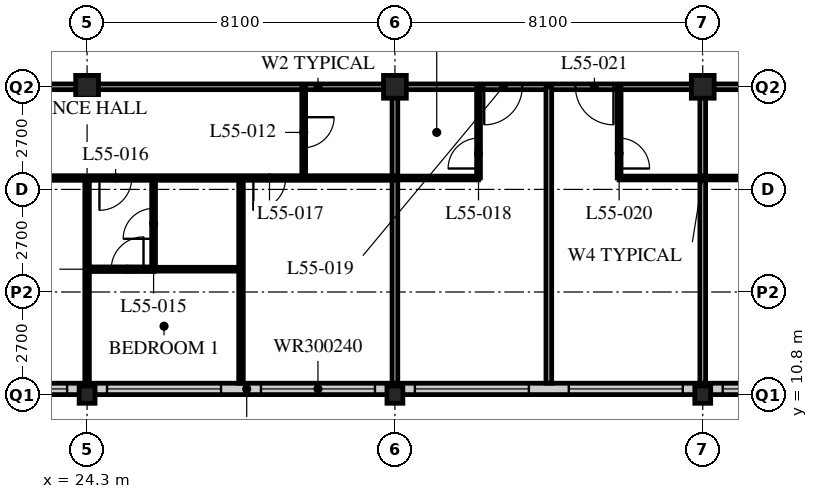
"""IFC4 building model, lengths in metres.
Left out: names, types, materials, properties, quantities, classifications, styles, units other than length and angle.
Written with IfcOpenShell. Run it as: python <this file> out.ifc"""

import sys

from ifc_helpers import new_model, si_unit, direction, frame, frame_2d, origin, origin_2d, place, context, subcontext, project, spatial, rectangle, hollow_rectangle, i_section, extrude, element, fill, save


model = new_model("IFC4")
c1 = context("Model", 3, precision=1e-05, world=origin(), true_north=direction((0.0, 1.0)))
c2 = subcontext(c1, "Body", "Model", "MODEL_VIEW")
j1 = project(units=[si_unit("LENGTHUNIT", "METRE"), si_unit("PLANEANGLEUNIT", "RADIAN")], contexts=[c1])
p1 = place(None, origin())
s1 = spatial("IfcSite", under=j1, at=p1, CompositionType="ELEMENT")
p2 = place(p1, origin())
s2 = spatial("IfcBuilding", under=s1, at=p2, CompositionType="ELEMENT")
p3 = place(p2, frame((0.0, 0.0, 213.6)))
s3 = spatial("IfcBuildingStorey", under=s2, at=p3, CompositionType="ELEMENT", Elevation=213.6)
p4 = place(p3, frame((24.3, 10.8, 0.0), z_axis=(0.0, 0.0, 1.0), x_axis=(1.0, 0.0, 0.0)))
e1 = element("IfcColumn", 1, at=p4, inside=s3, PredefinedType="COLUMN", context=c2, shape_type="SweptSolid", body=[
    extrude(i_section(OverallWidth=0.418, OverallDepth=0.456, WebThickness=0.042, FlangeThickness=0.067, FilletRadius=0.015, at=origin_2d()), origin(), (0.0, 0.0, 1.0), 3.6),
])
p5 = place(p3, frame((24.3, 18.9, 0.0), z_axis=(0.0, 0.0, 1.0), x_axis=(1.0, 0.0, 0.0)))
e2 = element("IfcColumn", 2, at=p5, inside=s3, PredefinedType="COLUMN", context=c2, shape_type="SweptSolid", body=[
    extrude(hollow_rectangle(XDim=0.6, YDim=0.6, WallThickness=0.05, at=origin_2d()), origin(), (0.0, 0.0, 1.0), 3.6),
])
p6 = place(p3, frame((32.4, 10.8, 0.0), z_axis=(0.0, 0.0, 1.0), x_axis=(1.0, 0.0, 0.0)))
e3 = element("IfcColumn", 3, at=p6, inside=s3, PredefinedType="COLUMN", context=c2, shape_type="SweptSolid", body=[
    extrude(i_section(OverallWidth=0.418, OverallDepth=0.456, WebThickness=0.042, FlangeThickness=0.067, FilletRadius=0.015, at=origin_2d()), origin(), (0.0, 0.0, 1.0), 3.6),
])
p7 = place(p3, frame((32.4, 18.9, 0.0), z_axis=(0.0, 0.0, 1.0), x_axis=(1.0, 0.0, 0.0)))
e4 = element("IfcColumn", 4, at=p7, inside=s3, PredefinedType="COLUMN", context=c2, shape_type="SweptSolid", body=[
    extrude(hollow_rectangle(XDim=0.6, YDim=0.6, WallThickness=0.05, at=origin_2d()), origin(), (0.0, 0.0, 1.0), 3.6),
])
p8 = place(p3, frame((40.5, 10.8, 0.0), z_axis=(0.0, 0.0, 1.0), x_axis=(1.0, 0.0, 0.0)))
e5 = element("IfcColumn", 5, at=p8, inside=s3, PredefinedType="COLUMN", context=c2, shape_type="SweptSolid", body=[
    extrude(i_section(OverallWidth=0.418, OverallDepth=0.456, WebThickness=0.042, FlangeThickness=0.067, FilletRadius=0.015, at=origin_2d()), origin(), (0.0, 0.0, 1.0), 3.6),
])
p9 = place(p3, frame((40.5, 18.9, 0.0), z_axis=(0.0, 0.0, 1.0), x_axis=(1.0, 0.0, 0.0)))
e6 = element("IfcColumn", 6, at=p9, inside=s3, PredefinedType="COLUMN", context=c2, shape_type="SweptSolid", body=[
    extrude(hollow_rectangle(XDim=0.6, YDim=0.6, WallThickness=0.05, at=origin_2d()), origin(), (0.0, 0.0, 1.0), 3.6),
])
p10 = place(p3, frame((8.4, 10.95, 0.0), z_axis=(0.0, 0.0, 1.0), x_axis=(1.0, 0.0, 0.0)))
e7 = element("IfcWall", 7, at=p10, inside=s3, PredefinedType="SOLIDWALL", context=c2, shape_type="SweptSolid", body=[
    extrude(rectangle(XDim=40.2, YDim=0.3, at=frame_2d((20.1, 0.0))), origin(), (0.0, 0.0, 1.0), 3.39),
])
p11 = place(p10, frame((0.225, 0.0, 0.6)))
e8 = element("IfcOpeningElement", 8, at=p11, cuts=e7, PredefinedType="OPENING", context=c2, shape_type="SweptSolid", body=[
    extrude(rectangle(XDim=3.0, YDim=2.4, at=frame_2d((1.5, 1.2))), frame((0.0, 0.16, 0.0), z_axis=(0.0, -1.0, 0.0), x_axis=(1.0, 0.0, 0.0)), (0.0, 0.0, 1.0), 0.32),
])
p12 = place(p10, frame((4.275, 0.0, 0.6)))
e9 = element("IfcOpeningElement", 9, at=p12, cuts=e7, PredefinedType="OPENING", context=c2, shape_type="SweptSolid", body=[
    extrude(rectangle(XDim=3.0, YDim=2.4, at=frame_2d((1.5, 1.2))), frame((0.0, 0.16, 0.0), z_axis=(0.0, -1.0, 0.0), x_axis=(1.0, 0.0, 0.0)), (0.0, 0.0, 1.0), 0.32),
])
p13 = place(p10, frame((8.325, 0.0, 0.6)))
e10 = element("IfcOpeningElement", 10, at=p13, cuts=e7, PredefinedType="OPENING", context=c2, shape_type="SweptSolid", body=[
    extrude(rectangle(XDim=3.0, YDim=2.4, at=frame_2d((1.5, 1.2))), frame((0.0, 0.16, 0.0), z_axis=(0.0, -1.0, 0.0), x_axis=(1.0, 0.0, 0.0)), (0.0, 0.0, 1.0), 0.32),
])
p14 = place(p10, frame((12.375, 0.0, 0.6)))
e11 = element("IfcOpeningElement", 11, at=p14, cuts=e7, PredefinedType="OPENING", context=c2, shape_type="SweptSolid", body=[
    extrude(rectangle(XDim=3.0, YDim=2.4, at=frame_2d((1.5, 1.2))), frame((0.0, 0.16, 0.0), z_axis=(0.0, -1.0, 0.0), x_axis=(1.0, 0.0, 0.0)), (0.0, 0.0, 1.0), 0.32),
])
p15 = place(p10, frame((16.425, 0.0, 0.6)))
e12 = element("IfcOpeningElement", 12, at=p15, cuts=e7, PredefinedType="OPENING", context=c2, shape_type="SweptSolid", body=[
    extrude(rectangle(XDim=3.0, YDim=2.4, at=frame_2d((1.5, 1.2))), frame((0.0, 0.16, 0.0), z_axis=(0.0, -1.0, 0.0), x_axis=(1.0, 0.0, 0.0)), (0.0, 0.0, 1.0), 0.32),
])
p16 = place(p10, frame((20.475, 0.0, 0.6)))
e13 = element("IfcOpeningElement", 13, at=p16, cuts=e7, PredefinedType="OPENING", context=c2, shape_type="SweptSolid", body=[
    extrude(rectangle(XDim=3.0, YDim=2.4, at=frame_2d((1.5, 1.2))), frame((0.0, 0.16, 0.0), z_axis=(0.0, -1.0, 0.0), x_axis=(1.0, 0.0, 0.0)), (0.0, 0.0, 1.0), 0.32),
])
p17 = place(p10, frame((24.525, 0.0, 0.6)))
e14 = element("IfcOpeningElement", 14, at=p17, cuts=e7, PredefinedType="OPENING", context=c2, shape_type="SweptSolid", body=[
    extrude(rectangle(XDim=3.0, YDim=2.4, at=frame_2d((1.5, 1.2))), frame((0.0, 0.16, 0.0), z_axis=(0.0, -1.0, 0.0), x_axis=(1.0, 0.0, 0.0)), (0.0, 0.0, 1.0), 0.32),
])
p18 = place(p10, frame((28.575, 0.0, 0.6)))
e15 = element("IfcOpeningElement", 15, at=p18, cuts=e7, PredefinedType="OPENING", context=c2, shape_type="SweptSolid", body=[
    extrude(rectangle(XDim=3.0, YDim=2.4, at=frame_2d((1.5, 1.2))), frame((0.0, 0.16, 0.0), z_axis=(0.0, -1.0, 0.0), x_axis=(1.0, 0.0, 0.0)), (0.0, 0.0, 1.0), 0.32),
])
p19 = place(p10, frame((32.625, 0.0, 0.6)))
e16 = element("IfcOpeningElement", 16, at=p19, cuts=e7, PredefinedType="OPENING", context=c2, shape_type="SweptSolid", body=[
    extrude(rectangle(XDim=3.0, YDim=2.4, at=frame_2d((1.5, 1.2))), frame((0.0, 0.16, 0.0), z_axis=(0.0, -1.0, 0.0), x_axis=(1.0, 0.0, 0.0)), (0.0, 0.0, 1.0), 0.32),
])
p20 = place(p10, frame((36.675, 0.0, 0.6)))
e17 = element("IfcOpeningElement", 17, at=p20, cuts=e7, PredefinedType="OPENING", context=c2, shape_type="SweptSolid", body=[
    extrude(rectangle(XDim=3.0, YDim=2.4, at=frame_2d((1.5, 1.2))), frame((0.0, 0.16, 0.0), z_axis=(0.0, -1.0, 0.0), x_axis=(1.0, 0.0, 0.0)), (0.0, 0.0, 1.0), 0.32),
])
p21 = place(p3, frame((12.15, 18.9, 0.0), z_axis=(0.0, 0.0, 1.0), x_axis=(1.0, 0.0, 0.0)))
e18 = element("IfcWall", 18, at=p21, inside=s3, PredefinedType="PARTITIONING", context=c2, shape_type="SweptSolid", body=[
    extrude(rectangle(XDim=36.45, YDim=0.15, at=frame_2d((18.225, 0.0))), origin(), (0.0, 0.0, 1.0), 2.778),
])
p22 = place(p21, frame((4.95, 0.0, 0.0)))
e19 = element("IfcOpeningElement", 19, at=p22, cuts=e18, PredefinedType="OPENING", context=c2, shape_type="SweptSolid", body=[
    extrude(rectangle(XDim=1.0, YDim=2.1, at=frame_2d((0.5, 1.05))), frame((0.0, 0.085, 0.0), z_axis=(0.0, -1.0, 0.0), x_axis=(1.0, 0.0, 0.0)), (0.0, 0.0, 1.0), 0.17),
])
p23 = place(p21, frame((22.6, 0.0, 0.0)))
e20 = element("IfcOpeningElement", 20, at=p23, cuts=e18, PredefinedType="OPENING", context=c2, shape_type="SweptSolid", body=[
    extrude(rectangle(XDim=1.0, YDim=2.1, at=frame_2d((0.5, 1.05))), frame((0.0, 0.085, 0.0), z_axis=(0.0, -1.0, 0.0), x_axis=(1.0, 0.0, 0.0)), (0.0, 0.0, 1.0), 0.17),
])
p24 = place(p21, frame((25.0, 0.0, 0.0)))
e21 = element("IfcOpeningElement", 21, at=p24, cuts=e18, PredefinedType="OPENING", context=c2, shape_type="SweptSolid", body=[
    extrude(rectangle(XDim=1.0, YDim=2.1, at=frame_2d((0.5, 1.05))), frame((0.0, 0.085, 0.0), z_axis=(0.0, -1.0, 0.0), x_axis=(1.0, 0.0, 0.0)), (0.0, 0.0, 1.0), 0.17),
])
p25 = place(p21, frame((30.7, 0.0, 0.0)))
e22 = element("IfcOpeningElement", 22, at=p25, cuts=e18, PredefinedType="OPENING", context=c2, shape_type="SweptSolid", body=[
    extrude(rectangle(XDim=1.0, YDim=2.1, at=frame_2d((0.5, 1.05))), frame((0.0, 0.085, 0.0), z_axis=(0.0, -1.0, 0.0), x_axis=(1.0, 0.0, 0.0)), (0.0, 0.0, 1.0), 0.17),
])
p26 = place(p21, frame((1.525, 0.0, 0.0)))
e23 = element("IfcOpeningElement", 23, at=p26, cuts=e18, PredefinedType="OPENING", context=c2, shape_type="SweptSolid", body=[
    extrude(rectangle(XDim=1.0, YDim=2.1, at=frame_2d((0.5, 1.05))), frame((0.0, 0.085, 0.0), z_axis=(0.0, -1.0, 0.0), x_axis=(1.0, 0.0, 0.0)), (0.0, 0.0, 1.0), 0.17),
])
p27 = place(p21, frame((32.825, 0.0, 0.0)))
e24 = element("IfcOpeningElement", 24, at=p27, cuts=e18, PredefinedType="OPENING", context=c2, shape_type="SweptSolid", body=[
    extrude(rectangle(XDim=1.0, YDim=2.1, at=frame_2d((0.5, 1.05))), frame((0.0, 0.085, 0.0), z_axis=(0.0, -1.0, 0.0), x_axis=(1.0, 0.0, 0.0)), (0.0, 0.0, 1.0), 0.17),
])
p28 = place(p3, frame((30.0, 18.9, 0.0), z_axis=(0.0, 0.0, 1.0), x_axis=(0.0, -1.0, 0.0)))
e25 = element("IfcWall", 25, at=p28, inside=s3, PredefinedType="PARTITIONING", context=c2, shape_type="SweptSolid", body=[
    extrude(rectangle(XDim=2.4, YDim=0.1, at=frame_2d((1.2, 0.0))), origin(), (0.0, 0.0, 1.0), 3.39),
])
p29 = place(p28, frame((0.8, 0.0, 0.0)))
e26 = element("IfcOpeningElement", 26, at=p29, cuts=e25, PredefinedType="OPENING", context=c2, shape_type="SweptSolid", body=[
    extrude(rectangle(XDim=0.8, YDim=2.1, at=frame_2d((0.4, 1.05))), frame((0.0, 0.06, 0.0), z_axis=(0.0, -1.0, 0.0), x_axis=(1.0, 0.0, 0.0)), (0.0, 0.0, 1.0), 0.12),
])
p30 = place(p3, frame((26.05, 16.5, 0.0), z_axis=(0.0, 0.0, 1.0), x_axis=(0.0, -1.0, 0.0)))
e27 = element("IfcWall", 27, at=p30, inside=s3, PredefinedType="PARTITIONING", context=c2, shape_type="SweptSolid", body=[
    extrude(rectangle(XDim=2.4, YDim=0.1, at=frame_2d((1.2, 0.0))), origin(), (0.0, 0.0, 1.0), 3.39),
])
p31 = place(p30, frame((0.8, 0.0, 0.0)))
e28 = element("IfcOpeningElement", 28, at=p31, cuts=e27, PredefinedType="OPENING", context=c2, shape_type="SweptSolid", body=[
    extrude(rectangle(XDim=0.8, YDim=2.1, at=frame_2d((0.4, 1.05))), frame((0.0, 0.06, 0.0), z_axis=(0.0, -1.0, 0.0), x_axis=(1.0, 0.0, 0.0)), (0.0, 0.0, 1.0), 0.12),
])
p32 = place(p3, frame((26.05, 14.1, 0.0), z_axis=(0.0, 0.0, 1.0), x_axis=(1.0, 0.0, 0.0)))
e29 = element("IfcWall", 29, at=p32, inside=s3, PredefinedType="PARTITIONING", context=c2, shape_type="SweptSolid", body=[
    extrude(rectangle(XDim=2.3, YDim=0.1, at=frame_2d((1.15, 0.0))), origin(), (0.0, 0.0, 1.0), 3.39),
])
p33 = place(p3, frame((24.3, 16.5, 0.0), z_axis=(0.0, 0.0, 1.0), x_axis=(0.0, -1.0, 0.0)))
e30 = element("IfcWall", 30, at=p33, inside=s3, PredefinedType="PARTITIONING", context=c2, shape_type="SweptSolid", body=[
    extrude(rectangle(XDim=5.4, YDim=0.12, at=frame_2d((2.7, 0.0))), origin(), (0.0, 0.0, 1.0), 2.778),
])
p34 = place(p3, frame((28.35, 16.5, 0.0), z_axis=(0.0, 0.0, 1.0), x_axis=(0.0, -1.0, 0.0)))
e31 = element("IfcWall", 31, at=p34, inside=s3, PredefinedType="PARTITIONING", context=c2, shape_type="SweptSolid", body=[
    extrude(rectangle(XDim=5.4, YDim=0.12, at=frame_2d((2.7, 0.0))), origin(), (0.0, 0.0, 1.0), 3.39),
])
p35 = place(p3, frame((32.4, 18.9, 0.0), z_axis=(0.0, 0.0, 1.0), x_axis=(0.0, -1.0, 0.0)))
e32 = element("IfcWall", 32, at=p35, inside=s3, PredefinedType="PARTITIONING", context=c2, shape_type="SweptSolid", body=[
    extrude(rectangle(XDim=7.8, YDim=0.15, at=frame_2d((3.9, 0.0))), origin(), (0.0, 0.0, 1.0), 2.778),
])
p36 = place(p3, frame((32.4, 16.5, 0.0), z_axis=(0.0, 0.0, 1.0), x_axis=(1.0, 0.0, 0.0)))
e33 = element("IfcWall", 33, at=p36, inside=s3, PredefinedType="PARTITIONING", context=c2, shape_type="SweptSolid", body=[
    extrude(rectangle(XDim=2.2, YDim=0.1, at=frame_2d((1.1, 0.0))), origin(), (0.0, 0.0, 1.0), 3.39),
])
p37 = place(p3, frame((34.6, 18.9, 0.0), z_axis=(0.0, 0.0, 1.0), x_axis=(0.0, -1.0, 0.0)))
e34 = element("IfcWall", 34, at=p37, inside=s3, PredefinedType="PARTITIONING", context=c2, shape_type="SweptSolid", body=[
    extrude(rectangle(XDim=2.4, YDim=0.1, at=frame_2d((1.2, 0.0))), origin(), (0.0, 0.0, 1.0), 3.39),
])
p38 = place(p37, frame((1.35, 0.0, 0.0)))
e35 = element("IfcOpeningElement", 35, at=p38, cuts=e34, PredefinedType="OPENING", context=c2, shape_type="SweptSolid", body=[
    extrude(rectangle(XDim=0.8, YDim=2.1, at=frame_2d((0.4, 1.05))), frame((0.0, 0.06, 0.0), z_axis=(0.0, -1.0, 0.0), x_axis=(1.0, 0.0, 0.0)), (0.0, 0.0, 1.0), 0.12),
])
p39 = place(p3, frame((36.45, 18.9, 0.0), z_axis=(0.0, 0.0, 1.0), x_axis=(0.0, -1.0, 0.0)))
e36 = element("IfcWall", 36, at=p39, inside=s3, PredefinedType="PARTITIONING", context=c2, shape_type="SweptSolid", body=[
    extrude(rectangle(XDim=7.8, YDim=0.15, at=frame_2d((3.9, 0.0))), origin(), (0.0, 0.0, 1.0), 3.39),
])
p40 = place(p3, frame((38.3, 16.5, 0.0), z_axis=(0.0, 0.0, 1.0), x_axis=(1.0, 0.0, 0.0)))
e37 = element("IfcWall", 37, at=p40, inside=s3, PredefinedType="PARTITIONING", context=c2, shape_type="SweptSolid", body=[
    extrude(rectangle(XDim=4.4, YDim=0.1, at=frame_2d((2.2, 0.0))), origin(), (0.0, 0.0, 1.0), 3.39),
])
p41 = place(p3, frame((38.3, 18.9, 0.0), z_axis=(0.0, 0.0, 1.0), x_axis=(0.0, -1.0, 0.0)))
e38 = element("IfcWall", 38, at=p41, inside=s3, PredefinedType="PARTITIONING", context=c2, shape_type="SweptSolid", body=[
    extrude(rectangle(XDim=2.4, YDim=0.1, at=frame_2d((1.2, 0.0))), origin(), (0.0, 0.0, 1.0), 3.39),
])
p42 = place(p41, frame((1.35, 0.0, 0.0)))
e39 = element("IfcOpeningElement", 39, at=p42, cuts=e38, PredefinedType="OPENING", context=c2, shape_type="SweptSolid", body=[
    extrude(rectangle(XDim=0.8, YDim=2.1, at=frame_2d((0.4, 1.05))), frame((0.0, 0.06, 0.0), z_axis=(0.0, -1.0, 0.0), x_axis=(1.0, 0.0, 0.0)), (0.0, 0.0, 1.0), 0.12),
])
p43 = place(p3, frame((40.5, 18.9, 0.0), z_axis=(0.0, 0.0, 1.0), x_axis=(0.0, -1.0, 0.0)))
e40 = element("IfcWall", 40, at=p43, inside=s3, PredefinedType="PARTITIONING", context=c2, shape_type="SweptSolid", body=[
    extrude(rectangle(XDim=7.8, YDim=0.15, at=frame_2d((3.9, 0.0))), origin(), (0.0, 0.0, 1.0), 2.778),
])
p44 = place(p3, frame((8.15, 16.5, 0.0), z_axis=(0.0, 0.0, 1.0), x_axis=(1.0, 0.0, 0.0)))
e41 = element("IfcWall", 41, at=p44, inside=s3, PredefinedType="PARTITIONING", context=c2, shape_type="SweptSolid", body=[
    extrude(rectangle(XDim=24.25, YDim=0.12, at=frame_2d((12.125, 0.0))), origin(), (0.0, 0.0, 1.0), 3.39),
])
p45 = place(p44, frame((9.025, 0.0, 0.0)))
e42 = element("IfcOpeningElement", 42, at=p45, cuts=e41, PredefinedType="OPENING", context=c2, shape_type="SweptSolid", body=[
    extrude(rectangle(XDim=0.85, YDim=2.1, at=frame_2d((0.425, 1.05))), frame((0.0, 0.07, 0.0), z_axis=(0.0, -1.0, 0.0), x_axis=(1.0, 0.0, 0.0)), (0.0, 0.0, 1.0), 0.14),
])
p46 = place(p44, frame((16.475, 0.0, 0.0)))
e43 = element("IfcOpeningElement", 43, at=p46, cuts=e41, PredefinedType="OPENING", context=c2, shape_type="SweptSolid", body=[
    extrude(rectangle(XDim=0.85, YDim=2.1, at=frame_2d((0.425, 1.05))), frame((0.0, 0.07, 0.0), z_axis=(0.0, -1.0, 0.0), x_axis=(1.0, 0.0, 0.0)), (0.0, 0.0, 1.0), 0.14),
])
p47 = place(p44, frame((20.525, 0.0, 0.0)))
e44 = element("IfcOpeningElement", 44, at=p47, cuts=e41, PredefinedType="OPENING", context=c2, shape_type="SweptSolid", body=[
    extrude(rectangle(XDim=0.85, YDim=2.1, at=frame_2d((0.425, 1.05))), frame((0.0, 0.07, 0.0), z_axis=(0.0, -1.0, 0.0), x_axis=(1.0, 0.0, 0.0)), (0.0, 0.0, 1.0), 0.14),
])
p48 = place(p44, frame((6.725, 0.0, 0.0)))
e45 = element("IfcOpeningElement", 45, at=p48, cuts=e41, PredefinedType="OPENING", context=c2, shape_type="SweptSolid", body=[
    extrude(rectangle(XDim=0.85, YDim=2.1, at=frame_2d((0.425, 1.05))), frame((0.0, 0.07, 0.0), z_axis=(0.0, -1.0, 0.0), x_axis=(1.0, 0.0, 0.0)), (0.0, 0.0, 1.0), 0.14),
])
p49 = place(p44, frame((2.875, 0.0, 0.0)))
e46 = element("IfcOpeningElement", 46, at=p49, cuts=e41, PredefinedType="OPENING", context=c2, shape_type="SweptSolid", body=[
    extrude(rectangle(XDim=0.85, YDim=2.1, at=frame_2d((0.425, 1.05))), frame((0.0, 0.07, 0.0), z_axis=(0.0, -1.0, 0.0), x_axis=(1.0, 0.0, 0.0)), (0.0, 0.0, 1.0), 0.14),
])
p50 = place(p3, frame((26.06, 14.1, 0.0), z_axis=(0.0, 0.0, 1.0), x_axis=(-1.0, 0.0, 0.0)))
e47 = element("IfcWall", 47, at=p50, inside=s3, PredefinedType="PARTITIONING", context=c2, shape_type="SweptSolid", body=[
    extrude(rectangle(XDim=1.76, YDim=0.12, at=frame_2d((0.88, 0.0))), origin(), (0.0, 0.0, 1.0), 3.39),
])
p51 = place(p50, frame((0.275, 0.0, 0.0)))
e48 = element("IfcOpeningElement", 48, at=p51, cuts=e47, PredefinedType="OPENING", context=c2, shape_type="SweptSolid", body=[
    extrude(rectangle(XDim=0.85, YDim=2.1, at=frame_2d((0.425, 1.05))), frame((0.0, 0.07, 0.0), z_axis=(0.0, -1.0, 0.0), x_axis=(1.0, 0.0, 0.0)), (0.0, 0.0, 1.0), 0.14),
])
p52 = place(p14, origin())
e49 = element("IfcWindow", 49, at=p52, inside=s3, PartitioningType="SINGLE_PANEL", PredefinedType="WINDOW", context=c2, shape_type="SweptSolid", body=[
    extrude(rectangle(XDim=3.0, YDim=2.4, at=frame_2d((1.5, 1.2))), frame((0.0, 0.03, 0.0), z_axis=(0.0, -1.0, 0.0), x_axis=(1.0, 0.0, 0.0)), (0.0, 0.0, 1.0), 0.06),
])
fill(e11, e49)
p53 = place(p15, origin())
e50 = element("IfcWindow", 50, at=p53, inside=s3, PartitioningType="SINGLE_PANEL", PredefinedType="WINDOW", context=c2, shape_type="SweptSolid", body=[
    extrude(rectangle(XDim=3.0, YDim=2.4, at=frame_2d((1.5, 1.2))), frame((0.0, 0.03, 0.0), z_axis=(0.0, -1.0, 0.0), x_axis=(1.0, 0.0, 0.0)), (0.0, 0.0, 1.0), 0.06),
])
fill(e12, e50)
p54 = place(p16, origin())
e51 = element("IfcWindow", 51, at=p54, inside=s3, PartitioningType="SINGLE_PANEL", PredefinedType="WINDOW", context=c2, shape_type="SweptSolid", body=[
    extrude(rectangle(XDim=3.0, YDim=2.4, at=frame_2d((1.5, 1.2))), frame((0.0, 0.03, 0.0), z_axis=(0.0, -1.0, 0.0), x_axis=(1.0, 0.0, 0.0)), (0.0, 0.0, 1.0), 0.06),
])
fill(e13, e51)
p55 = place(p17, origin())
e52 = element("IfcWindow", 52, at=p55, inside=s3, PartitioningType="SINGLE_PANEL", PredefinedType="WINDOW", context=c2, shape_type="SweptSolid", body=[
    extrude(rectangle(XDim=3.0, YDim=2.4, at=frame_2d((1.5, 1.2))), frame((0.0, 0.03, 0.0), z_axis=(0.0, -1.0, 0.0), x_axis=(1.0, 0.0, 0.0)), (0.0, 0.0, 1.0), 0.06),
])
fill(e14, e52)
p56 = place(p18, origin())
e53 = element("IfcWindow", 53, at=p56, inside=s3, PartitioningType="SINGLE_PANEL", PredefinedType="WINDOW", context=c2, shape_type="SweptSolid", body=[
    extrude(rectangle(XDim=3.0, YDim=2.4, at=frame_2d((1.5, 1.2))), frame((0.0, 0.03, 0.0), z_axis=(0.0, -1.0, 0.0), x_axis=(1.0, 0.0, 0.0)), (0.0, 0.0, 1.0), 0.06),
])
fill(e15, e53)
p57 = place(p19, origin())
e54 = element("IfcWindow", 54, at=p57, inside=s3, PartitioningType="SINGLE_PANEL", PredefinedType="WINDOW", context=c2, shape_type="SweptSolid", body=[
    extrude(rectangle(XDim=3.0, YDim=2.4, at=frame_2d((1.5, 1.2))), frame((0.0, 0.03, 0.0), z_axis=(0.0, -1.0, 0.0), x_axis=(1.0, 0.0, 0.0)), (0.0, 0.0, 1.0), 0.06),
])
fill(e16, e54)
p58 = place(p29, origin())
e55 = element("IfcDoor", 55, at=p58, inside=s3, OperationType="SINGLE_SWING_LEFT", PredefinedType="DOOR", context=c2, shape_type="SweptSolid", body=[
    extrude(rectangle(XDim=0.8, YDim=2.1, at=frame_2d((0.4, 1.05))), frame((0.0, 0.025, 0.0), z_axis=(0.0, -1.0, 0.0), x_axis=(1.0, 0.0, 0.0)), (0.0, 0.0, 1.0), 0.05),
])
fill(e26, e55)
p59 = place(p31, origin())
e56 = element("IfcDoor", 56, at=p59, inside=s3, OperationType="SINGLE_SWING_LEFT", PredefinedType="DOOR", context=c2, shape_type="SweptSolid", body=[
    extrude(rectangle(XDim=0.8, YDim=2.1, at=frame_2d((0.4, 1.05))), frame((0.0, 0.025, 0.0), z_axis=(0.0, -1.0, 0.0), x_axis=(1.0, 0.0, 0.0)), (0.0, 0.0, 1.0), 0.05),
])
fill(e28, e56)
p60 = place(p46, origin())
e57 = element("IfcDoor", 57, at=p60, inside=s3, OperationType="SINGLE_SWING_RIGHT", PredefinedType="DOOR", context=c2, shape_type="SweptSolid", body=[
    extrude(rectangle(XDim=0.85, YDim=2.1, at=frame_2d((0.425, 1.05))), frame((0.0, 0.025, 0.0), z_axis=(0.0, -1.0, 0.0), x_axis=(1.0, 0.0, 0.0)), (0.0, 0.0, 1.0), 0.05),
])
fill(e43, e57)
p61 = place(p47, origin())
e58 = element("IfcDoor", 58, at=p61, inside=s3, OperationType="SINGLE_SWING_RIGHT", PredefinedType="DOOR", context=c2, shape_type="SweptSolid", body=[
    extrude(rectangle(XDim=0.85, YDim=2.1, at=frame_2d((0.425, 1.05))), frame((0.0, 0.025, 0.0), z_axis=(0.0, -1.0, 0.0), x_axis=(1.0, 0.0, 0.0)), (0.0, 0.0, 1.0), 0.05),
])
fill(e44, e58)
p62 = place(p38, origin())
e59 = element("IfcDoor", 59, at=p62, inside=s3, OperationType="SINGLE_SWING_LEFT", PredefinedType="DOOR", context=c2, shape_type="SweptSolid", body=[
    extrude(rectangle(XDim=0.8, YDim=2.1, at=frame_2d((0.4, 1.05))), frame((0.0, 0.025, 0.0), z_axis=(0.0, -1.0, 0.0), x_axis=(1.0, 0.0, 0.0)), (0.0, 0.0, 1.0), 0.05),
])
fill(e35, e59)
p63 = place(p23, origin())
e60 = element("IfcDoor", 60, at=p63, inside=s3, OperationType="SINGLE_SWING_RIGHT", PredefinedType="DOOR", context=c2, shape_type="SweptSolid", body=[
    extrude(rectangle(XDim=1.0, YDim=2.1, at=frame_2d((0.5, 1.05))), frame((0.0, 0.025, 0.0), z_axis=(0.0, -1.0, 0.0), x_axis=(1.0, 0.0, 0.0)), (0.0, 0.0, 1.0), 0.05),
])
fill(e20, e60)
p64 = place(p42, origin())
e61 = element("IfcDoor", 61, at=p64, inside=s3, OperationType="SINGLE_SWING_RIGHT", PredefinedType="DOOR", context=c2, shape_type="SweptSolid", body=[
    extrude(rectangle(XDim=0.8, YDim=2.1, at=frame_2d((0.4, 1.05))), frame((0.0, 0.025, 0.0), z_axis=(0.0, -1.0, 0.0), x_axis=(1.0, 0.0, 0.0)), (0.0, 0.0, 1.0), 0.05),
])
fill(e39, e61)
p65 = place(p24, origin())
e62 = element("IfcDoor", 62, at=p65, inside=s3, OperationType="SINGLE_SWING_LEFT", PredefinedType="DOOR", context=c2, shape_type="SweptSolid", body=[
    extrude(rectangle(XDim=1.0, YDim=2.1, at=frame_2d((0.5, 1.05))), frame((0.0, 0.025, 0.0), z_axis=(0.0, -1.0, 0.0), x_axis=(1.0, 0.0, 0.0)), (0.0, 0.0, 1.0), 0.05),
])
fill(e21, e62)
p66 = place(p51, origin())
e63 = element("IfcDoor", 63, at=p66, inside=s3, OperationType="SINGLE_SWING_RIGHT", PredefinedType="DOOR", context=c2, shape_type="SweptSolid", body=[
    extrude(rectangle(XDim=0.85, YDim=2.1, at=frame_2d((0.425, 1.05))), frame((0.0, 0.025, 0.0), z_axis=(0.0, -1.0, 0.0), x_axis=(1.0, 0.0, 0.0)), (0.0, 0.0, 1.0), 0.05),
])
fill(e48, e63)
save(model, sys.argv[1])
